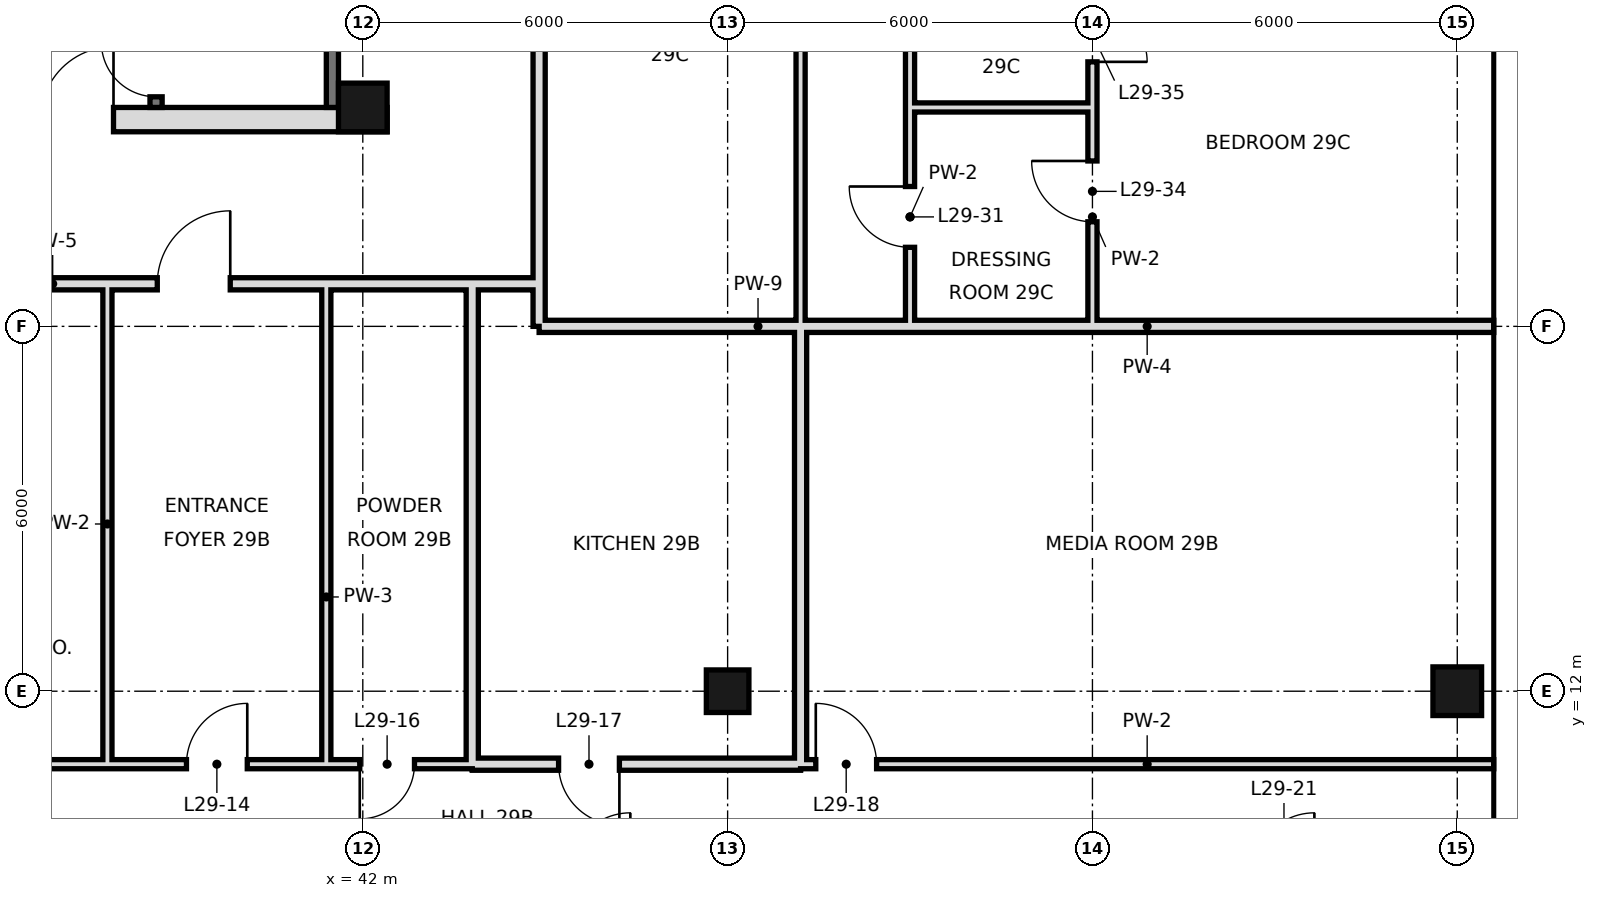
"""IFC4 building model, lengths in metres.
Left out: names, types, materials, properties, quantities, classifications, styles, units other than length and angle.
Written with IfcOpenShell. Run it as: python <this file> out.ifc"""

import sys

from ifc_helpers import new_model, si_unit, direction, frame, frame_2d, origin, origin_2d, place, context, subcontext, project, spatial, rectangle, hollow_rectangle, extrude, element, fill, save


model = new_model("IFC4")
c1 = context("Model", 3, precision=1e-05, world=origin(), true_north=direction((0.0, 1.0)))
c2 = subcontext(c1, "Body", "Model", "MODEL_VIEW")
j1 = project(units=[si_unit("LENGTHUNIT", "METRE"), si_unit("PLANEANGLEUNIT", "RADIAN")], contexts=[c1])
p1 = place(None, origin())
s1 = spatial("IfcSite", under=j1, at=p1, CompositionType="ELEMENT")
p2 = place(p1, origin())
s2 = spatial("IfcBuilding", under=s1, at=p2, CompositionType="ELEMENT")
p3 = place(p2, frame((0.0, 0.0, 130.4)))
s3 = spatial("IfcBuildingStorey", under=s2, at=p3, CompositionType="ELEMENT", Elevation=130.4)
p4 = place(p3, frame((42.0, 21.6, 0.0), z_axis=(0.0, 0.0, 1.0), x_axis=(1.0, 0.0, 0.0)))
e1 = element("IfcColumn", 1, at=p4, inside=s3, PredefinedType="COLUMN", context=c2, shape_type="SweptSolid", body=[
    extrude(hollow_rectangle(XDim=0.8, YDim=0.8, WallThickness=0.05, at=origin_2d()), origin(), (0.0, 0.0, 1.0), 3.6),
])
p5 = place(p3, frame((48.0, 12.0, 0.0), z_axis=(0.0, 0.0, 1.0), x_axis=(1.0, 0.0, 0.0)))
e2 = element("IfcColumn", 2, at=p5, inside=s3, PredefinedType="COLUMN", context=c2, shape_type="SweptSolid", body=[
    extrude(hollow_rectangle(XDim=0.7, YDim=0.7, WallThickness=0.036, at=origin_2d()), origin(), (0.0, 0.0, 1.0), 3.6),
])
p6 = place(p3, frame((60.0, 12.0, 0.0), z_axis=(0.0, 0.0, 1.0), x_axis=(1.0, 0.0, 0.0)))
e3 = element("IfcColumn", 3, at=p6, inside=s3, PredefinedType="COLUMN", context=c2, shape_type="SweptSolid", body=[
    extrude(hollow_rectangle(XDim=0.8, YDim=0.8, WallThickness=0.04, at=origin_2d()), origin(), (0.0, 0.0, 1.0), 3.6),
])
for number, where, z_axis, x_axis in (
    (4, (37.8, 10.8, 0.0), (0.0, 0.0, 1.0), (0.0, 1.0, 0.0)),
    (5, (41.4, 10.8, 0.0), (0.0, 0.0, 1.0), (0.0, 1.0, 0.0)),
):
    element("IfcWall", number, at=place(p3, frame(where, z_axis=z_axis, x_axis=x_axis)), inside=s3, PredefinedType="PARTITIONING", context=c2, shape_type="SweptSolid", body=[
        extrude(rectangle(XDim=7.9, YDim=0.15, at=frame_2d((3.95, 0.0))), origin(), (0.0, 0.0, 1.0), 3.42),
    ])
p7 = place(p3, frame((43.8, 10.8, 0.0), z_axis=(0.0, 0.0, 1.0), x_axis=(0.0, 1.0, 0.0)))
e6 = element("IfcWall", 6, at=p7, inside=s3, PredefinedType="SOLIDWALL", context=c2, shape_type="SweptSolid", body=[
    extrude(rectangle(XDim=7.9, YDim=0.2, at=frame_2d((3.95, 0.0))), origin(), (0.0, 0.0, 1.0), 2.72),
])
p8 = place(p3, frame((44.9, 18.7, 0.0), z_axis=(0.0, 0.0, 1.0), x_axis=(0.0, 1.0, 0.0)))
e7 = element("IfcWall", 7, at=p8, inside=s3, PredefinedType="SOLIDWALL", context=c2, shape_type="SweptSolid", body=[
    extrude(rectangle(XDim=25.7, YDim=0.2, at=frame_2d((12.85, 0.0))), origin(), (0.0, 0.0, 1.0), 2.97),
])
p9 = place(p8, frame((22.7, 0.0, 0.0)))
e8 = element("IfcOpeningElement", 8, at=p9, cuts=e7, PredefinedType="OPENING", context=c2, shape_type="SweptSolid", body=[
    extrude(rectangle(XDim=1.2, YDim=2.4, at=frame_2d((0.6, 1.2))), frame((0.0, 0.11, 0.0), z_axis=(0.0, -1.0, 0.0), x_axis=(1.0, 0.0, 0.0)), (0.0, 0.0, 1.0), 0.22),
])
p10 = place(p3, frame((44.9, 18.0, 0.0), z_axis=(0.0, 0.0, 1.0), x_axis=(0.0, 1.0, 0.0)))
e9 = element("IfcWall", 9, at=p10, inside=s3, PredefinedType="SOLIDWALL", context=c2, shape_type="SweptSolid", body=[
    extrude(rectangle(XDim=0.7, YDim=0.2, at=frame_2d((0.35, 0.0))), origin(), (0.0, 0.0, 1.0), 2.97),
])
p11 = place(p3, frame((49.2, 10.8, 0.0), z_axis=(0.0, 0.0, 1.0), x_axis=(0.0, 1.0, 0.0)))
e10 = element("IfcWall", 10, at=p11, inside=s3, PredefinedType="SOLIDWALL", context=c2, shape_type="SweptSolid", body=[
    extrude(rectangle(XDim=7.2, YDim=0.2, at=frame_2d((3.6, 0.0))), origin(), (0.0, 0.0, 1.0), 2.72),
])
p12 = place(p3, frame((49.2, 18.0, 0.0), z_axis=(0.0, 0.0, 1.0), x_axis=(0.0, 1.0, 0.0)))
e11 = element("IfcWall", 11, at=p12, inside=s3, PredefinedType="PARTITIONING", context=c2, shape_type="SweptSolid", body=[
    extrude(rectangle(XDim=19.2, YDim=0.15, at=frame_2d((9.6, 0.0))), origin(), (0.0, 0.0, 1.0), 3.42),
])
p13 = place(p12, frame((6.76, 0.0, 0.0)))
e12 = element("IfcOpeningElement", 12, at=p13, cuts=e11, PredefinedType="OPENING", context=c2, shape_type="SweptSolid", body=[
    extrude(rectangle(XDim=1.0, YDim=2.4, at=frame_2d((0.5, 1.2))), frame((0.0, 0.085, 0.0), z_axis=(0.0, -1.0, 0.0), x_axis=(1.0, 0.0, 0.0)), (0.0, 0.0, 1.0), 0.17),
])
p14 = place(p12, frame((13.12, 0.0, 0.0)))
e13 = element("IfcOpeningElement", 13, at=p14, cuts=e11, PredefinedType="OPENING", context=c2, shape_type="SweptSolid", body=[
    extrude(rectangle(XDim=1.0, YDim=2.4, at=frame_2d((0.5, 1.2))), frame((0.0, 0.085, 0.0), z_axis=(0.0, -1.0, 0.0), x_axis=(1.0, 0.0, 0.0)), (0.0, 0.0, 1.0), 0.17),
])
p15 = place(p3, frame((51.0, 18.0, 0.0), z_axis=(0.0, 0.0, 1.0), x_axis=(0.0, 1.0, 0.0)))
e14 = element("IfcWall", 14, at=p15, inside=s3, PredefinedType="PARTITIONING", context=c2, shape_type="SweptSolid", body=[
    extrude(rectangle(XDim=3.6, YDim=0.15, at=frame_2d((1.8, 0.0))), origin(), (0.0, 0.0, 1.0), 3.42),
])
p16 = place(p15, frame((1.3, 0.0, 0.0)))
e15 = element("IfcOpeningElement", 15, at=p16, cuts=e14, PredefinedType="OPENING", context=c2, shape_type="SweptSolid", body=[
    extrude(rectangle(XDim=1.0, YDim=2.4, at=frame_2d((0.5, 1.2))), frame((0.0, 0.085, 0.0), z_axis=(0.0, -1.0, 0.0), x_axis=(1.0, 0.0, 0.0)), (0.0, 0.0, 1.0), 0.17),
])
p17 = place(p3, frame((51.0, 21.6, 0.0), z_axis=(0.0, 0.0, 1.0), x_axis=(0.0, 1.0, 0.0)))
e16 = element("IfcWall", 16, at=p17, inside=s3, PredefinedType="PARTITIONING", context=c2, shape_type="SweptSolid", body=[
    extrude(rectangle(XDim=2.4, YDim=0.15, at=frame_2d((1.2, 0.0))), origin(), (0.0, 0.0, 1.0), 3.42),
])
p18 = place(p3, frame((54.0, 18.0, 0.0), z_axis=(0.0, 0.0, 1.0), x_axis=(0.0, 1.0, 0.0)))
e17 = element("IfcWall", 17, at=p18, inside=s3, PredefinedType="PARTITIONING", context=c2, shape_type="SweptSolid", body=[
    extrude(rectangle(XDim=3.6, YDim=0.15, at=frame_2d((1.8, 0.0))), origin(), (0.0, 0.0, 1.0), 3.42),
])
p19 = place(p18, frame((1.72, 0.0, 0.0)))
e18 = element("IfcOpeningElement", 18, at=p19, cuts=e17, PredefinedType="OPENING", context=c2, shape_type="SweptSolid", body=[
    extrude(rectangle(XDim=1.0, YDim=2.4, at=frame_2d((0.5, 1.2))), frame((0.0, 0.085, 0.0), z_axis=(0.0, -1.0, 0.0), x_axis=(1.0, 0.0, 0.0)), (0.0, 0.0, 1.0), 0.17),
])
p20 = place(p3, frame((54.0, 21.6, 0.0), z_axis=(0.0, 0.0, 1.0), x_axis=(0.0, 1.0, 0.0)))
e19 = element("IfcWall", 19, at=p20, inside=s3, PredefinedType="PARTITIONING", context=c2, shape_type="SweptSolid", body=[
    extrude(rectangle(XDim=2.4, YDim=0.15, at=frame_2d((1.2, 0.0))), origin(), (0.0, 0.0, 1.0), 3.42),
])
p21 = place(p20, frame((0.75, 0.0, 0.0)))
e20 = element("IfcOpeningElement", 20, at=p21, cuts=e19, PredefinedType="OPENING", context=c2, shape_type="SweptSolid", body=[
    extrude(rectangle(XDim=0.9, YDim=2.4, at=frame_2d((0.45, 1.2))), frame((0.0, 0.085, 0.0), z_axis=(0.0, -1.0, 0.0), x_axis=(1.0, 0.0, 0.0)), (0.0, 0.0, 1.0), 0.17),
])
p22 = place(p3, frame((43.8, 10.8, 0.0), z_axis=(0.0, 0.0, 1.0), x_axis=(1.0, 0.0, 0.0)))
e21 = element("IfcWall", 21, at=p22, inside=s3, PredefinedType="SOLIDWALL", context=c2, shape_type="SweptSolid", body=[
    extrude(rectangle(XDim=5.4, YDim=0.2, at=frame_2d((2.7, 0.0))), origin(), (0.0, 0.0, 1.0), 2.72),
])
p23 = place(p22, frame((1.42, 0.0, 0.0)))
e22 = element("IfcOpeningElement", 22, at=p23, cuts=e21, PredefinedType="OPENING", context=c2, shape_type="SweptSolid", body=[
    extrude(rectangle(XDim=1.0, YDim=2.4, at=frame_2d((0.5, 1.2))), frame((0.0, 0.11, 0.0), z_axis=(0.0, -1.0, 0.0), x_axis=(1.0, 0.0, 0.0)), (0.0, 0.0, 1.0), 0.22),
])
p24 = place(p3, frame((30.0, 10.8, 0.0), z_axis=(0.0, 0.0, 1.0), x_axis=(1.0, 0.0, 0.0)))
e23 = element("IfcWall", 23, at=p24, inside=s3, PredefinedType="PARTITIONING", context=c2, shape_type="SweptSolid", body=[
    extrude(rectangle(XDim=11.4, YDim=0.15, at=frame_2d((5.7, 0.0))), origin(), (0.0, 0.0, 1.0), 3.42),
])
p25 = place(p24, frame((9.1, 0.0, 0.0)))
e24 = element("IfcOpeningElement", 24, at=p25, cuts=e23, PredefinedType="OPENING", context=c2, shape_type="SweptSolid", body=[
    extrude(rectangle(XDim=1.0, YDim=2.4, at=frame_2d((0.5, 1.2))), frame((0.0, 0.085, 0.0), z_axis=(0.0, -1.0, 0.0), x_axis=(1.0, 0.0, 0.0)), (0.0, 0.0, 1.0), 0.17),
])
p26 = place(p24, frame((3.4, 0.0, 0.0)))
e25 = element("IfcOpeningElement", 25, at=p26, cuts=e23, PredefinedType="OPENING", context=c2, shape_type="SweptSolid", body=[
    extrude(rectangle(XDim=1.0, YDim=2.4, at=frame_2d((0.5, 1.2))), frame((0.0, 0.085, 0.0), z_axis=(0.0, -1.0, 0.0), x_axis=(1.0, 0.0, 0.0)), (0.0, 0.0, 1.0), 0.17),
])
p27 = place(p3, frame((49.2, 10.8, 0.0), z_axis=(0.0, 0.0, 1.0), x_axis=(1.0, 0.0, 0.0)))
e26 = element("IfcWall", 26, at=p27, inside=s3, PredefinedType="PARTITIONING", context=c2, shape_type="SweptSolid", body=[
    extrude(rectangle(XDim=11.4, YDim=0.15, at=frame_2d((5.7, 0.0))), origin(), (0.0, 0.0, 1.0), 3.42),
])
p28 = place(p27, frame((0.25, 0.0, 0.0)))
e27 = element("IfcOpeningElement", 27, at=p28, cuts=e26, PredefinedType="OPENING", context=c2, shape_type="SweptSolid", body=[
    extrude(rectangle(XDim=1.0, YDim=2.4, at=frame_2d((0.5, 1.2))), frame((0.0, 0.085, 0.0), z_axis=(0.0, -1.0, 0.0), x_axis=(1.0, 0.0, 0.0)), (0.0, 0.0, 1.0), 0.17),
])
p29 = place(p3, frame((41.4, 10.8, 0.0), z_axis=(0.0, 0.0, 1.0), x_axis=(1.0, 0.0, 0.0)))
e28 = element("IfcWall", 28, at=p29, inside=s3, PredefinedType="PARTITIONING", context=c2, shape_type="SweptSolid", body=[
    extrude(rectangle(XDim=2.4, YDim=0.15, at=frame_2d((1.2, 0.0))), origin(), (0.0, 0.0, 1.0), 3.42),
])
p30 = place(p29, frame((0.55, 0.0, 0.0)))
e29 = element("IfcOpeningElement", 29, at=p30, cuts=e28, PredefinedType="OPENING", context=c2, shape_type="SweptSolid", body=[
    extrude(rectangle(XDim=0.9, YDim=2.4, at=frame_2d((0.45, 1.2))), frame((0.0, 0.085, 0.0), z_axis=(0.0, -1.0, 0.0), x_axis=(1.0, 0.0, 0.0)), (0.0, 0.0, 1.0), 0.17),
])
p31 = place(p3, frame((44.9, 18.0, 0.0), z_axis=(0.0, 0.0, 1.0), x_axis=(1.0, 0.0, 0.0)))
e30 = element("IfcWall", 30, at=p31, inside=s3, PredefinedType="SOLIDWALL", context=c2, shape_type="SweptSolid", body=[
    extrude(rectangle(XDim=4.3, YDim=0.2, at=frame_2d((2.15, 0.0))), origin(), (0.0, 0.0, 1.0), 2.72),
])
p32 = place(p3, frame((49.2, 18.0, 0.0), z_axis=(0.0, 0.0, 1.0), x_axis=(1.0, 0.0, 0.0)))
e31 = element("IfcWall", 31, at=p32, inside=s3, PredefinedType="SOLIDWALL", context=c2, shape_type="SweptSolid", body=[
    extrude(rectangle(XDim=11.4, YDim=0.2, at=frame_2d((5.7, 0.0))), origin(), (0.0, 0.0, 1.0), 2.72),
])
p33 = place(p3, frame((30.0, 18.7, 0.0), z_axis=(0.0, 0.0, 1.0), x_axis=(1.0, 0.0, 0.0)))
e32 = element("IfcWall", 32, at=p33, inside=s3, PredefinedType="SOLIDWALL", context=c2, shape_type="SweptSolid", body=[
    extrude(rectangle(XDim=13.8, YDim=0.2, at=frame_2d((6.9, 0.0))), origin(), (0.0, 0.0, 1.0), 2.72),
])
p34 = place(p33, frame((8.62, 0.0, 0.0)))
e33 = element("IfcOpeningElement", 33, at=p34, cuts=e32, PredefinedType="OPENING", context=c2, shape_type="SweptSolid", body=[
    extrude(rectangle(XDim=1.2, YDim=2.4, at=frame_2d((0.6, 1.2))), frame((0.0, 0.11, 0.0), z_axis=(0.0, -1.0, 0.0), x_axis=(1.0, 0.0, 0.0)), (0.0, 0.0, 1.0), 0.22),
])
p35 = place(p3, frame((43.8, 18.7, 0.0), z_axis=(0.0, 0.0, 1.0), x_axis=(1.0, 0.0, 0.0)))
e34 = element("IfcWall", 34, at=p35, inside=s3, PredefinedType="SOLIDWALL", context=c2, shape_type="SweptSolid", body=[
    extrude(rectangle(XDim=1.1, YDim=0.2, at=frame_2d((0.55, 0.0))), origin(), (0.0, 0.0, 1.0), 3.42),
])
p36 = place(p3, frame((51.0, 21.6, 0.0), z_axis=(0.0, 0.0, 1.0), x_axis=(1.0, 0.0, 0.0)))
e35 = element("IfcWall", 35, at=p36, inside=s3, PredefinedType="PARTITIONING", context=c2, shape_type="SweptSolid", body=[
    extrude(rectangle(XDim=3.0, YDim=0.15, at=frame_2d((1.5, 0.0))), origin(), (0.0, 0.0, 1.0), 3.42),
])
p37 = place(p3, frame((41.5, 21.6, 0.0), z_axis=(0.0, 0.0, 1.0), x_axis=(0.0, 1.0, 0.0)))
e36 = element("IfcWall", 36, at=p37, inside=s3, PredefinedType="SOLIDWALL", context=c2, shape_type="SweptSolid", body=[
    extrude(rectangle(XDim=23.5, YDim=0.2, at=frame_2d((11.75, 0.0))), origin(), (0.0, 0.0, 1.0), 3.42),
])
p38 = place(p3, frame((5.6, 21.4, 0.0), z_axis=(0.0, 0.0, 1.0), x_axis=(1.0, 0.0, 0.0)))
e37 = element("IfcWall", 37, at=p38, inside=s3, PredefinedType="SOLIDWALL", context=c2, shape_type="SweptSolid", body=[
    extrude(rectangle(XDim=36.8, YDim=0.4, at=frame_2d((18.4, 0.0))), origin(), (0.0, 0.0, 1.0), 3.42),
])
p39 = place(p38, frame((8.5, 0.0, 0.0)))
e38 = element("IfcOpeningElement", 38, at=p39, cuts=e37, PredefinedType="OPENING", context=c2, shape_type="SweptSolid", body=[
    extrude(rectangle(XDim=1.8, YDim=2.1, at=frame_2d((0.9, 1.05))), frame((0.0, 0.21, 0.0), z_axis=(0.0, -1.0, 0.0), x_axis=(1.0, 0.0, 0.0)), (0.0, 0.0, 1.0), 0.42),
])
p40 = place(p38, frame((17.5, 0.0, 0.0)))
e39 = element("IfcOpeningElement", 39, at=p40, cuts=e37, PredefinedType="OPENING", context=c2, shape_type="SweptSolid", body=[
    extrude(rectangle(XDim=1.8, YDim=2.1, at=frame_2d((0.9, 1.05))), frame((0.0, 0.21, 0.0), z_axis=(0.0, -1.0, 0.0), x_axis=(1.0, 0.0, 0.0)), (0.0, 0.0, 1.0), 0.42),
])
p41 = place(p38, frame((26.5, 0.0, 0.0)))
e40 = element("IfcOpeningElement", 40, at=p41, cuts=e37, PredefinedType="OPENING", context=c2, shape_type="SweptSolid", body=[
    extrude(rectangle(XDim=1.8, YDim=2.1, at=frame_2d((0.9, 1.05))), frame((0.0, 0.21, 0.0), z_axis=(0.0, -1.0, 0.0), x_axis=(1.0, 0.0, 0.0)), (0.0, 0.0, 1.0), 0.42),
])
p42 = place(p38, frame((4.5, 0.0, 0.0)))
e41 = element("IfcOpeningElement", 41, at=p42, cuts=e37, PredefinedType="OPENING", context=c2, shape_type="SweptSolid", body=[
    extrude(rectangle(XDim=1.2, YDim=2.1, at=frame_2d((0.6, 1.05))), frame((0.0, 0.21, 0.0), z_axis=(0.0, -1.0, 0.0), x_axis=(1.0, 0.0, 0.0)), (0.0, 0.0, 1.0), 0.42),
])
p43 = place(p38, frame((31.1, 0.0, 0.0)))
e42 = element("IfcOpeningElement", 42, at=p43, cuts=e37, PredefinedType="OPENING", context=c2, shape_type="SweptSolid", body=[
    extrude(rectangle(XDim=1.2, YDim=2.1, at=frame_2d((0.6, 1.05))), frame((0.0, 0.21, 0.0), z_axis=(0.0, -1.0, 0.0), x_axis=(1.0, 0.0, 0.0)), (0.0, 0.0, 1.0), 0.42),
])
p44 = place(p3, frame((38.6, 21.6, 0.0), z_axis=(0.0, 0.0, 1.0), x_axis=(0.0, 1.0, 0.0)))
e43 = element("IfcWall", 43, at=p44, inside=s3, PredefinedType="SOLIDWALL", context=c2, shape_type="SweptSolid", body=[
    extrude(rectangle(XDim=23.4, YDim=0.2, at=frame_2d((11.7, 0.0))), origin(), (0.0, 0.0, 1.0), 3.42),
])
p45 = place(p44, frame((8.6, 0.0, 0.0)))
e44 = element("IfcOpeningElement", 44, at=p45, cuts=e43, PredefinedType="OPENING", context=c2, shape_type="SweptSolid", body=[
    extrude(rectangle(XDim=1.0, YDim=2.1, at=frame_2d((0.5, 1.05))), frame((0.0, 0.11, 0.0), z_axis=(0.0, -1.0, 0.0), x_axis=(1.0, 0.0, 0.0)), (0.0, 0.0, 1.0), 0.22),
])
p46 = place(p44, frame((13.25, 0.0, 0.0)))
e45 = element("IfcOpeningElement", 45, at=p46, cuts=e43, PredefinedType="OPENING", context=c2, shape_type="SweptSolid", body=[
    extrude(rectangle(XDim=1.0, YDim=2.1, at=frame_2d((0.5, 1.05))), frame((0.0, 0.11, 0.0), z_axis=(0.0, -1.0, 0.0), x_axis=(1.0, 0.0, 0.0)), (0.0, 0.0, 1.0), 0.22),
])
p47 = place(p44, frame((22.1, 0.0, 0.0)))
e46 = element("IfcOpeningElement", 46, at=p47, cuts=e43, PredefinedType="OPENING", context=c2, shape_type="SweptSolid", body=[
    extrude(rectangle(XDim=1.0, YDim=2.1, at=frame_2d((0.5, 1.05))), frame((0.0, 0.11, 0.0), z_axis=(0.0, -1.0, 0.0), x_axis=(1.0, 0.0, 0.0)), (0.0, 0.0, 1.0), 0.22),
])
p48 = place(p44, frame((0.175, 0.0, 0.0)))
e47 = element("IfcOpeningElement", 47, at=p48, cuts=e43, PredefinedType="OPENING", context=c2, shape_type="SweptSolid", body=[
    extrude(rectangle(XDim=0.9, YDim=2.1, at=frame_2d((0.45, 1.05))), frame((0.0, 0.11, 0.0), z_axis=(0.0, -1.0, 0.0), x_axis=(1.0, 0.0, 0.0)), (0.0, 0.0, 1.0), 0.22),
])
p49 = place(p25, frame((1.0, 0.0, 0.0), z_axis=(0.0, 0.0, 1.0), x_axis=(-1.0, 0.0, 0.0)))
e48 = element("IfcDoor", 48, at=p49, inside=s3, OperationType="SINGLE_SWING_LEFT", PredefinedType="DOOR", context=c2, shape_type="SweptSolid", body=[
    extrude(rectangle(XDim=1.0, YDim=2.4, at=frame_2d((0.5, 1.2))), frame((0.0, 0.025, 0.0), z_axis=(0.0, -1.0, 0.0), x_axis=(1.0, 0.0, 0.0)), (0.0, 0.0, 1.0), 0.05),
])
fill(e24, e48)
p50 = place(p30, frame((0.9, 0.0, 0.0), z_axis=(0.0, 0.0, 1.0), x_axis=(-1.0, 0.0, 0.0)))
e49 = element("IfcDoor", 49, at=p50, inside=s3, OperationType="SINGLE_SWING_RIGHT", PredefinedType="DOOR", context=c2, shape_type="SweptSolid", body=[
    extrude(rectangle(XDim=0.9, YDim=2.4, at=frame_2d((0.45, 1.2))), frame((0.0, 0.025, 0.0), z_axis=(0.0, -1.0, 0.0), x_axis=(1.0, 0.0, 0.0)), (0.0, 0.0, 1.0), 0.05),
])
fill(e29, e49)
p51 = place(p23, origin())
e50 = element("IfcDoor", 50, at=p51, inside=s3, OperationType="SINGLE_SWING_RIGHT", PredefinedType="DOOR", context=c2, shape_type="SweptSolid", body=[
    extrude(rectangle(XDim=1.0, YDim=2.4, at=frame_2d((0.5, 1.2))), frame((0.0, 0.025, 0.0), z_axis=(0.0, -1.0, 0.0), x_axis=(1.0, 0.0, 0.0)), (0.0, 0.0, 1.0), 0.05),
])
fill(e22, e50)
p52 = place(p28, origin())
e51 = element("IfcDoor", 51, at=p52, inside=s3, OperationType="SINGLE_SWING_LEFT", PredefinedType="DOOR", context=c2, shape_type="SweptSolid", body=[
    extrude(rectangle(XDim=1.0, YDim=2.4, at=frame_2d((0.5, 1.2))), frame((0.0, 0.025, 0.0), z_axis=(0.0, -1.0, 0.0), x_axis=(1.0, 0.0, 0.0)), (0.0, 0.0, 1.0), 0.05),
])
fill(e27, e51)
p53 = place(p16, frame((1.0, 0.0, 0.0), z_axis=(0.0, 0.0, 1.0), x_axis=(-1.0, 0.0, 0.0)))
e52 = element("IfcDoor", 52, at=p53, inside=s3, OperationType="SINGLE_SWING_LEFT", PredefinedType="DOOR", context=c2, shape_type="SweptSolid", body=[
    extrude(rectangle(XDim=1.0, YDim=2.4, at=frame_2d((0.5, 1.2))), frame((0.0, 0.025, 0.0), z_axis=(0.0, -1.0, 0.0), x_axis=(1.0, 0.0, 0.0)), (0.0, 0.0, 1.0), 0.05),
])
fill(e15, e52)
p54 = place(p19, frame((1.0, 0.0, 0.0), z_axis=(0.0, 0.0, 1.0), x_axis=(-1.0, 0.0, 0.0)))
e53 = element("IfcDoor", 53, at=p54, inside=s3, OperationType="SINGLE_SWING_LEFT", PredefinedType="DOOR", context=c2, shape_type="SweptSolid", body=[
    extrude(rectangle(XDim=1.0, YDim=2.4, at=frame_2d((0.5, 1.2))), frame((0.0, 0.025, 0.0), z_axis=(0.0, -1.0, 0.0), x_axis=(1.0, 0.0, 0.0)), (0.0, 0.0, 1.0), 0.05),
])
fill(e18, e53)
p55 = place(p21, frame((0.9, 0.0, 0.0), z_axis=(0.0, 0.0, 1.0), x_axis=(-1.0, 0.0, 0.0)))
e54 = element("IfcDoor", 54, at=p55, inside=s3, OperationType="SINGLE_SWING_RIGHT", PredefinedType="DOOR", context=c2, shape_type="SweptSolid", body=[
    extrude(rectangle(XDim=0.9, YDim=2.4, at=frame_2d((0.45, 1.2))), frame((0.0, 0.025, 0.0), z_axis=(0.0, -1.0, 0.0), x_axis=(1.0, 0.0, 0.0)), (0.0, 0.0, 1.0), 0.05),
])
fill(e20, e54)
p56 = place(p34, frame((1.2, 0.0, 0.0), z_axis=(0.0, 0.0, 1.0), x_axis=(-1.0, 0.0, 0.0)))
e55 = element("IfcDoor", 55, at=p56, inside=s3, OperationType="SINGLE_SWING_LEFT", PredefinedType="DOOR", context=c2, shape_type="SweptSolid", body=[
    extrude(rectangle(XDim=1.2, YDim=2.4, at=frame_2d((0.6, 1.2))), frame((0.0, 0.025, 0.0), z_axis=(0.0, -1.0, 0.0), x_axis=(1.0, 0.0, 0.0)), (0.0, 0.0, 1.0), 0.05),
])
fill(e33, e55)
p57 = place(p43, frame((1.2, 0.0, 0.0), z_axis=(0.0, 0.0, 1.0), x_axis=(-1.0, 0.0, 0.0)))
e56 = element("IfcDoor", 56, at=p57, inside=s3, OperationType="SINGLE_SWING_LEFT", PredefinedType="DOOR", context=c2, shape_type="SweptSolid", body=[
    extrude(rectangle(XDim=1.2, YDim=2.1, at=frame_2d((0.6, 1.05))), frame((0.0, 0.025, 0.0), z_axis=(0.0, -1.0, 0.0), x_axis=(1.0, 0.0, 0.0)), (0.0, 0.0, 1.0), 0.05),
])
fill(e42, e56)
p58 = place(p48, frame((0.9, 0.0, 0.0), z_axis=(0.0, 0.0, 1.0), x_axis=(-1.0, 0.0, 0.0)))
e57 = element("IfcDoor", 57, at=p58, inside=s3, OperationType="SINGLE_SWING_LEFT", PredefinedType="DOOR", context=c2, shape_type="SweptSolid", body=[
    extrude(rectangle(XDim=0.9, YDim=2.1, at=frame_2d((0.45, 1.05))), frame((0.0, 0.025, 0.0), z_axis=(0.0, -1.0, 0.0), x_axis=(1.0, 0.0, 0.0)), (0.0, 0.0, 1.0), 0.05),
])
fill(e47, e57)
save(model, sys.argv[1])
